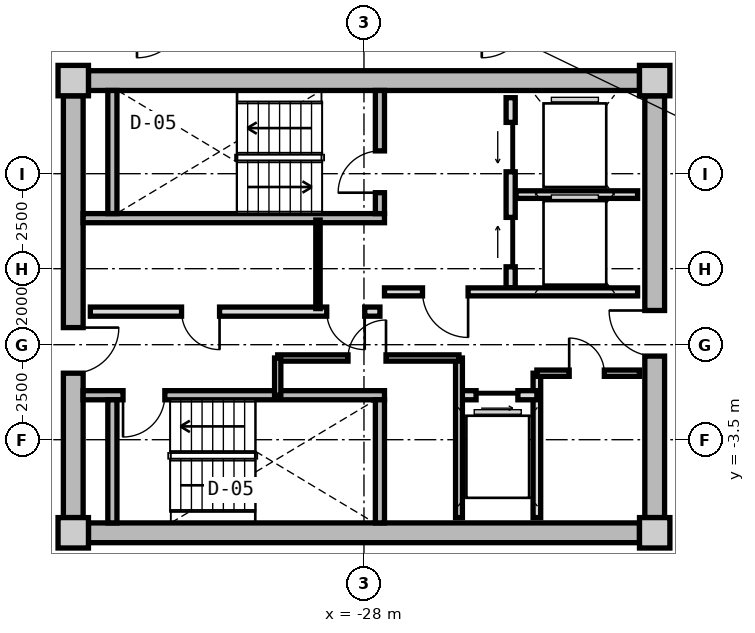
"""IFC4 building model, lengths in metres.
Left out: names, types, materials, properties, quantities, classifications, styles, units other than length and angle.
Written with IfcOpenShell. Run it as: python <this file> out.ifc"""

import sys

from ifc_helpers import new_model, si_unit, direction, frame, frame_2d, origin, origin_2d, place, context, subcontext, project, spatial, rectangle, extrude, source, transform, mapped, element, fill, save


model = new_model("IFC4")
c1 = context("Model", 3, precision=1e-05, world=origin(), true_north=direction((0.0, 1.0)))
c2 = subcontext(c1, "Body", "Model", "MODEL_VIEW")
j1 = project(units=[si_unit("LENGTHUNIT", "METRE"), si_unit("PLANEANGLEUNIT", "RADIAN")], contexts=[c1])
p1 = place(None, origin())
s1 = spatial("IfcSite", under=j1, at=p1, CompositionType="ELEMENT")
p2 = place(p1, origin())
s2 = spatial("IfcBuilding", under=s1, at=p2, CompositionType="ELEMENT")
p3 = place(p2, frame((0.0, 0.0, 213.9)))
s3 = spatial("IfcBuildingStorey", under=s2, at=p3, CompositionType="ELEMENT", Elevation=213.9)
m1 = source(origin(), c2, "Body", "SweptSolid", [
    extrude(rectangle(XDim=0.8, YDim=0.8, at=origin_2d()), origin(), (0.0, 0.0, 1.0), 3.05),
])
for number, where, z_axis, x_axis in (
    (1, (-35.65, -5.95, 0.0), (0.0, 0.0, 1.0), (1.0, 0.0, 0.0)),
    (2, (-20.35, -5.95, 0.0), (0.0, 0.0, 1.0), (1.0, 0.0, 0.0)),
    (3, (-20.35, 5.95, 0.0), (0.0, 0.0, 1.0), (1.0, 0.0, 0.0)),
    (4, (-35.65, 5.95, 0.0), (0.0, 0.0, 1.0), (1.0, 0.0, 0.0)),
):
    element("IfcColumn", number, at=place(p3, frame(where, z_axis=z_axis, x_axis=x_axis)), inside=s3, PredefinedType="COLUMN", context=c2, shape_type="MappedRepresentation", body=[
        mapped(m1, transform((0.0, 0.0, 0.0), x_axis=(1.0, 0.0, 0.0), y_axis=(0.0, 1.0, 0.0), z_axis=(0.0, 0.0, 1.0), scale=1.0)),
    ])
m2 = source(origin(), c2, "Body", "SweptSolid", [
    extrude(rectangle(XDim=14.5, YDim=0.52, at=frame_2d((7.25, 0.0))), origin(), (0.0, 0.0, 1.0), 2.76),
])
for number, where, z_axis, x_axis in (
    (5, (-35.25, 5.95, 0.0), (0.0, 0.0, 1.0), (1.0, 0.0, 0.0)),
    (6, (-20.75, -5.95, 0.0), (0.0, 0.0, 1.0), (-1.0, 0.0, 0.0)),
):
    element("IfcWall", number, at=place(p3, frame(where, z_axis=z_axis, x_axis=x_axis)), inside=s3, PredefinedType="SHEAR", context=c2, shape_type="MappedRepresentation", body=[
        mapped(m2, transform((0.0, 0.0, 0.0), x_axis=(1.0, 0.0, 0.0), y_axis=(0.0, 1.0, 0.0), z_axis=(0.0, 0.0, 1.0), scale=1.0)),
    ])
m3 = source(origin(), c2, "Body", "SweptSolid", [
    extrude(rectangle(XDim=11.1, YDim=0.52, at=frame_2d((5.55, 0.0))), origin(), (0.0, 0.0, 1.0), 2.76),
])
p4 = place(p3, frame((-35.65, -5.55, 0.0), z_axis=(0.0, 0.0, 1.0), x_axis=(0.0, 1.0, 0.0)))
e7 = element("IfcWall", 7, at=p4, inside=s3, PredefinedType="SHEAR", context=c2, shape_type="MappedRepresentation", body=[
    mapped(m3, transform((0.0, 0.0, 0.0), x_axis=(1.0, 0.0, 0.0), y_axis=(0.0, 1.0, 0.0), z_axis=(0.0, 0.0, 1.0), scale=1.0)),
])
p5 = place(p4, frame((3.8, 0.0, 0.0)))
e8 = element("IfcOpeningElement", 8, at=p5, cuts=e7, PredefinedType="OPENING", context=c2, shape_type="SweptSolid", body=[
    extrude(rectangle(XDim=1.2, YDim=2.15, at=frame_2d((0.6, 1.075))), frame((0.0, 0.27, 0.0), z_axis=(0.0, -1.0, 0.0), x_axis=(1.0, 0.0, 0.0)), (0.0, 0.0, 1.0), 0.54),
])
p6 = place(p3, frame((-20.35, 5.55, 0.0), z_axis=(0.0, 0.0, 1.0), x_axis=(0.0, -1.0, 0.0)))
e9 = element("IfcWall", 9, at=p6, inside=s3, PredefinedType="SHEAR", context=c2, shape_type="MappedRepresentation", body=[
    mapped(m3, transform((0.0, 0.0, 0.0), x_axis=(1.0, 0.0, 0.0), y_axis=(0.0, 1.0, 0.0), z_axis=(0.0, 0.0, 1.0), scale=1.0)),
])
p7 = place(p6, frame((5.65, 0.0, 0.0)))
e10 = element("IfcOpeningElement", 10, at=p7, cuts=e9, PredefinedType="OPENING", context=c2, shape_type="SweptSolid", body=[
    extrude(rectangle(XDim=1.2, YDim=2.15, at=frame_2d((0.6, 1.075))), frame((0.0, 0.27, 0.0), z_axis=(0.0, -1.0, 0.0), x_axis=(1.0, 0.0, 0.0)), (0.0, 0.0, 1.0), 0.54),
])
m4 = source(origin(), c2, "Body", "SweptSolid", [
    extrude(rectangle(XDim=7.93, YDim=0.24, at=frame_2d((3.965, 0.0))), origin(), (0.0, 0.0, 1.0), 2.76),
])
p8 = place(p3, frame((-35.39, 2.33, 0.0), z_axis=(0.0, 0.0, 1.0), x_axis=(1.0, 0.0, 0.0)))
e11 = element("IfcWall", 11, at=p8, inside=s3, PredefinedType="PARTITIONING", context=c2, shape_type="MappedRepresentation", body=[
    mapped(m4, transform((0.0, 0.0, 0.0), x_axis=(1.0, 0.0, 0.0), y_axis=(0.0, 1.0, 0.0), z_axis=(0.0, 0.0, 1.0), scale=1.0)),
])
m5 = source(origin(), c2, "Body", "SweptSolid", [
    extrude(rectangle(XDim=3.24, YDim=0.24, at=frame_2d((1.62, 0.0))), origin(), (0.0, 0.0, 1.0), 2.76),
])
p9 = place(p3, frame((-34.62, 2.45, 0.0), z_axis=(0.0, 0.0, 1.0), x_axis=(0.0, 1.0, 0.0)))
e12 = element("IfcWall", 12, at=p9, inside=s3, PredefinedType="PARTITIONING", context=c2, shape_type="MappedRepresentation", body=[
    mapped(m5, transform((0.0, 0.0, 0.0), x_axis=(1.0, 0.0, 0.0), y_axis=(0.0, 1.0, 0.0), z_axis=(0.0, 0.0, 1.0), scale=1.0)),
])
p10 = place(p3, frame((-27.58, 2.45, 0.0), z_axis=(0.0, 0.0, 1.0), x_axis=(0.0, 1.0, 0.0)))
e13 = element("IfcWall", 13, at=p10, inside=s3, PredefinedType="PARTITIONING", context=c2, shape_type="MappedRepresentation", body=[
    mapped(m5, transform((0.0, 0.0, 0.0), x_axis=(1.0, 0.0, 0.0), y_axis=(0.0, 1.0, 0.0), z_axis=(0.0, 0.0, 1.0), scale=1.0)),
])
p11 = place(p10, frame((0.55, 0.0, 0.0)))
e14 = element("IfcOpeningElement", 14, at=p11, cuts=e13, PredefinedType="OPENING", context=c2, shape_type="SweptSolid", body=[
    extrude(rectangle(XDim=1.1, YDim=2.15, at=frame_2d((0.55, 1.075))), frame((0.0, 0.13, 0.0), z_axis=(0.0, -1.0, 0.0), x_axis=(1.0, 0.0, 0.0)), (0.0, 0.0, 1.0), 0.26),
])
p12 = place(p3, frame((-35.39, -2.33, 0.0), z_axis=(0.0, 0.0, 1.0), x_axis=(1.0, 0.0, 0.0)))
e15 = element("IfcWall", 15, at=p12, inside=s3, PredefinedType="PARTITIONING", context=c2, shape_type="MappedRepresentation", body=[
    mapped(m4, transform((0.0, 0.0, 0.0), x_axis=(1.0, 0.0, 0.0), y_axis=(0.0, 1.0, 0.0), z_axis=(0.0, 0.0, 1.0), scale=1.0)),
])
p13 = place(p12, frame((1.05, 0.0, 0.0)))
e16 = element("IfcOpeningElement", 16, at=p13, cuts=e15, PredefinedType="OPENING", context=c2, shape_type="SweptSolid", body=[
    extrude(rectangle(XDim=1.1, YDim=2.15, at=frame_2d((0.55, 1.075))), frame((0.0, 0.13, 0.0), z_axis=(0.0, -1.0, 0.0), x_axis=(1.0, 0.0, 0.0)), (0.0, 0.0, 1.0), 0.26),
])
for number, where, z_axis, x_axis in (
    (17, (-34.62, -5.69, 0.0), (0.0, 0.0, 1.0), (0.0, 1.0, 0.0)),
    (18, (-27.58, -5.69, 0.0), (0.0, 0.0, 1.0), (0.0, 1.0, 0.0)),
):
    element("IfcWall", number, at=place(p3, frame(where, z_axis=z_axis, x_axis=x_axis)), inside=s3, PredefinedType="PARTITIONING", context=c2, shape_type="MappedRepresentation", body=[
        mapped(m5, transform((0.0, 0.0, 0.0), x_axis=(1.0, 0.0, 0.0), y_axis=(0.0, 1.0, 0.0), z_axis=(0.0, 0.0, 1.0), scale=1.0)),
    ])
m6 = source(origin(), c2, "Body", "SweptSolid", [
    extrude(rectangle(XDim=5.0, YDim=0.24, at=frame_2d((2.5, 0.0))), origin(), (0.0, 0.0, 1.0), 2.745),
])
p14 = place(p3, frame((-24.14, 0.5, 0.0), z_axis=(0.0, 0.0, 1.0), x_axis=(0.0, 1.0, 0.0)))
e19 = element("IfcWall", 19, at=p14, inside=s3, PredefinedType="PARTITIONING", context=c2, shape_type="MappedRepresentation", body=[
    mapped(m6, transform((0.0, 0.0, 0.0), x_axis=(1.0, 0.0, 0.0), y_axis=(0.0, 1.0, 0.0), z_axis=(0.0, 0.0, 1.0), scale=1.0)),
])
p15 = place(p14, frame((3.05, 0.0, 0.0)))
e20 = element("IfcOpeningElement", 20, at=p15, cuts=e19, PredefinedType="OPENING", context=c2, shape_type="SweptSolid", body=[
    extrude(rectangle(XDim=1.3, YDim=2.2, at=frame_2d((0.65, 1.1))), frame((0.0, 0.13, 0.0), z_axis=(0.0, -1.0, 0.0), x_axis=(1.0, 0.0, 0.0)), (0.0, 0.0, 1.0), 0.26),
])
p16 = place(p14, frame((0.55, 0.0, 0.0)))
e21 = element("IfcOpeningElement", 21, at=p16, cuts=e19, PredefinedType="OPENING", context=c2, shape_type="SweptSolid", body=[
    extrude(rectangle(XDim=1.3, YDim=2.2, at=frame_2d((0.65, 1.1))), frame((0.0, 0.13, 0.0), z_axis=(0.0, -1.0, 0.0), x_axis=(1.0, 0.0, 0.0)), (0.0, 0.0, 1.0), 0.26),
])
m7 = source(origin(), c2, "Body", "SweptSolid", [
    extrude(rectangle(XDim=3.2, YDim=0.2, at=frame_2d((1.6, 0.0))), origin(), (0.0, 0.0, 1.0), 2.745),
])
p17 = place(p3, frame((-24.0, 2.95, 0.0), z_axis=(0.0, 0.0, 1.0), x_axis=(1.0, 0.0, 0.0)))
e22 = element("IfcWall", 22, at=p17, inside=s3, PredefinedType="PARTITIONING", context=c2, shape_type="MappedRepresentation", body=[
    mapped(m7, transform((0.0, 0.0, 0.0), x_axis=(1.0, 0.0, 0.0), y_axis=(0.0, 1.0, 0.0), z_axis=(0.0, 0.0, 1.0), scale=1.0)),
])
m8 = source(origin(), c2, "Body", "SweptSolid", [
    extrude(rectangle(XDim=6.66, YDim=0.21, at=frame_2d((3.33, 0.0))), origin(), (0.0, 0.0, 1.0), 2.745),
])
p18 = place(p3, frame((-27.46, 0.39, 0.0), z_axis=(0.0, 0.0, 1.0), x_axis=(1.0, 0.0, 0.0)))
e23 = element("IfcWall", 23, at=p18, inside=s3, PredefinedType="PARTITIONING", context=c2, shape_type="MappedRepresentation", body=[
    mapped(m8, transform((0.0, 0.0, 0.0), x_axis=(1.0, 0.0, 0.0), y_axis=(0.0, 1.0, 0.0), z_axis=(0.0, 0.0, 1.0), scale=1.0)),
])
p19 = place(p18, frame((1.0, 0.0, 0.0)))
e24 = element("IfcOpeningElement", 24, at=p19, cuts=e23, PredefinedType="OPENING", context=c2, shape_type="SweptSolid", body=[
    extrude(rectangle(XDim=1.2, YDim=2.15, at=frame_2d((0.6, 1.075))), frame((0.0, 0.115, 0.0), z_axis=(0.0, -1.0, 0.0), x_axis=(1.0, 0.0, 0.0)), (0.0, 0.0, 1.0), 0.23),
])
m9 = source(origin(), c2, "Body", "SweptSolid", [
    extrude(rectangle(XDim=7.62, YDim=0.24, at=frame_2d((3.81, 0.0))), origin(), (0.0, 0.0, 1.0), 2.745),
])
p20 = place(p3, frame((-35.2, -0.13, 0.0), z_axis=(0.0, 0.0, 1.0), x_axis=(1.0, 0.0, 0.0)))
e25 = element("IfcWall", 25, at=p20, inside=s3, PredefinedType="PARTITIONING", context=c2, shape_type="MappedRepresentation", body=[
    mapped(m9, transform((0.0, 0.0, 0.0), x_axis=(1.0, 0.0, 0.0), y_axis=(0.0, 1.0, 0.0), z_axis=(0.0, 0.0, 1.0), scale=1.0)),
])
p21 = place(p20, frame((6.22, 0.0, 0.0)))
e26 = element("IfcOpeningElement", 26, at=p21, cuts=e25, PredefinedType="OPENING", context=c2, shape_type="SweptSolid", body=[
    extrude(rectangle(XDim=1.0, YDim=2.1, at=frame_2d((0.5, 1.05))), frame((0.0, 0.13, 0.0), z_axis=(0.0, -1.0, 0.0), x_axis=(1.0, 0.0, 0.0)), (0.0, 0.0, 1.0), 0.26),
])
p22 = place(p20, frame((2.4, 0.0, 0.0)))
e27 = element("IfcOpeningElement", 27, at=p22, cuts=e25, PredefinedType="OPENING", context=c2, shape_type="SweptSolid", body=[
    extrude(rectangle(XDim=1.0, YDim=2.1, at=frame_2d((0.5, 1.05))), frame((0.0, 0.13, 0.0), z_axis=(0.0, -1.0, 0.0), x_axis=(1.0, 0.0, 0.0)), (0.0, 0.0, 1.0), 0.26),
])
m10 = source(origin(), c2, "Body", "SweptSolid", [
    extrude(rectangle(XDim=2.33, YDim=0.115, at=frame_2d((1.165, 0.0))), origin(), (0.0, 0.0, 1.0), 2.745),
])
p23 = place(p3, frame((-29.21, -0.05, 0.0), z_axis=(0.0, 0.0, 1.0), x_axis=(0.0, 1.0, 0.0)))
e28 = element("IfcWall", 28, at=p23, inside=s3, PredefinedType="PARTITIONING", context=c2, shape_type="MappedRepresentation", body=[
    mapped(m10, transform((0.0, 0.0, 0.0), x_axis=(1.0, 0.0, 0.0), y_axis=(0.0, 1.0, 0.0), z_axis=(0.0, 0.0, 1.0), scale=1.0)),
])
m11 = source(origin(), c2, "Body", "SweptSolid", [
    extrude(rectangle(XDim=3.8, YDim=0.2, at=frame_2d((1.9, 0.0))), origin(), (0.0, 0.0, 1.0), 2.745),
])
p24 = place(p3, frame((-23.45, -5.55, 0.0), z_axis=(0.0, 0.0, 1.0), x_axis=(0.0, 1.0, 0.0)))
e29 = element("IfcWall", 29, at=p24, inside=s3, PredefinedType="PARTITIONING", context=c2, shape_type="MappedRepresentation", body=[
    mapped(m11, transform((0.0, 0.0, 0.0), x_axis=(1.0, 0.0, 0.0), y_axis=(0.0, 1.0, 0.0), z_axis=(0.0, 0.0, 1.0), scale=1.0)),
])
m12 = source(origin(), c2, "Body", "SweptSolid", [
    extrude(rectangle(XDim=2.05, YDim=0.24, at=frame_2d((1.025, 0.0))), origin(), (0.0, 0.0, 1.0), 2.745),
])
p25 = place(p3, frame((-25.5, -2.33, 0.0), z_axis=(0.0, 0.0, 1.0), x_axis=(1.0, 0.0, 0.0)))
e30 = element("IfcWall", 30, at=p25, inside=s3, PredefinedType="PARTITIONING", context=c2, shape_type="MappedRepresentation", body=[
    mapped(m12, transform((0.0, 0.0, 0.0), x_axis=(1.0, 0.0, 0.0), y_axis=(0.0, 1.0, 0.0), z_axis=(0.0, 0.0, 1.0), scale=1.0)),
])
p26 = place(p25, frame((0.45, 0.0, 0.0)))
e31 = element("IfcOpeningElement", 31, at=p26, cuts=e30, PredefinedType="OPENING", context=c2, shape_type="SweptSolid", body=[
    extrude(rectangle(XDim=1.1, YDim=2.2, at=frame_2d((0.55, 1.1))), frame((0.0, 0.13, 0.0), z_axis=(0.0, -1.0, 0.0), x_axis=(1.0, 0.0, 0.0)), (0.0, 0.0, 1.0), 0.26),
])
m13 = source(origin(), c2, "Body", "SweptSolid", [
    extrude(rectangle(XDim=4.2, YDim=0.18, at=frame_2d((2.1, 0.0))), origin(), (0.0, 0.0, 1.0), 2.745),
])
p27 = place(p3, frame((-25.5, -5.55, 0.0), z_axis=(0.0, 0.0, 1.0), x_axis=(0.0, 1.0, 0.0)))
e32 = element("IfcWall", 32, at=p27, inside=s3, PredefinedType="PARTITIONING", context=c2, shape_type="MappedRepresentation", body=[
    mapped(m13, transform((0.0, 0.0, 0.0), x_axis=(1.0, 0.0, 0.0), y_axis=(0.0, 1.0, 0.0), z_axis=(0.0, 0.0, 1.0), scale=1.0)),
])
m14 = source(origin(), c2, "Body", "SweptSolid", [
    extrude(rectangle(XDim=4.77, YDim=0.165, at=frame_2d((2.385, 0.0))), origin(), (0.0, 0.0, 1.0), 2.745),
])
p28 = place(p3, frame((-30.27, -1.35, 0.0), z_axis=(0.0, 0.0, 1.0), x_axis=(1.0, 0.0, 0.0)))
e33 = element("IfcWall", 33, at=p28, inside=s3, PredefinedType="PARTITIONING", context=c2, shape_type="MappedRepresentation", body=[
    mapped(m14, transform((0.0, 0.0, 0.0), x_axis=(1.0, 0.0, 0.0), y_axis=(0.0, 1.0, 0.0), z_axis=(0.0, 0.0, 1.0), scale=1.0)),
])
p29 = place(p28, frame((1.85, 0.0, 0.0)))
e34 = element("IfcOpeningElement", 34, at=p29, cuts=e33, PredefinedType="OPENING", context=c2, shape_type="SweptSolid", body=[
    extrude(rectangle(XDim=1.0, YDim=2.1, at=frame_2d((0.5, 1.05))), frame((0.0, 0.093, 0.0), z_axis=(0.0, -1.0, 0.0), x_axis=(1.0, 0.0, 0.0)), (0.0, 0.0, 1.0), 0.185),
])
m15 = source(origin(), c2, "Body", "SweptSolid", [
    extrude(rectangle(XDim=0.98, YDim=0.165, at=frame_2d((0.49, 0.0))), origin(), (0.0, 0.0, 1.0), 2.745),
])
p30 = place(p3, frame((-30.27, -2.33, 0.0), z_axis=(0.0, 0.0, 1.0), x_axis=(0.0, 1.0, 0.0)))
e35 = element("IfcWall", 35, at=p30, inside=s3, PredefinedType="PARTITIONING", context=c2, shape_type="MappedRepresentation", body=[
    mapped(m15, transform((0.0, 0.0, 0.0), x_axis=(1.0, 0.0, 0.0), y_axis=(0.0, 1.0, 0.0), z_axis=(0.0, 0.0, 1.0), scale=1.0)),
])
m16 = source(origin(), c2, "Body", "SweptSolid", [
    extrude(rectangle(XDim=2.7, YDim=0.165, at=frame_2d((1.35, 0.0))), origin(), (0.0, 0.0, 1.0), 2.745),
])
p31 = place(p3, frame((-23.45, -1.75, 0.0), z_axis=(0.0, 0.0, 1.0), x_axis=(1.0, 0.0, 0.0)))
e36 = element("IfcWall", 36, at=p31, inside=s3, PredefinedType="PARTITIONING", context=c2, shape_type="MappedRepresentation", body=[
    mapped(m16, transform((0.0, 0.0, 0.0), x_axis=(1.0, 0.0, 0.0), y_axis=(0.0, 1.0, 0.0), z_axis=(0.0, 0.0, 1.0), scale=1.0)),
])
p32 = place(p31, frame((0.85, 0.0, 0.0)))
e37 = element("IfcOpeningElement", 37, at=p32, cuts=e36, PredefinedType="OPENING", context=c2, shape_type="SweptSolid", body=[
    extrude(rectangle(XDim=0.925, YDim=2.1, at=frame_2d((0.462, 1.05))), frame((0.0, 0.093, 0.0), z_axis=(0.0, -1.0, 0.0), x_axis=(1.0, 0.0, 0.0)), (0.0, 0.0, 1.0), 0.185),
])
m17 = source(origin(), c2, "Body", "SweptSolid", [
    extrude(rectangle(XDim=1.1, YDim=2.15, at=frame_2d((0.55, 1.075))), frame((0.0, 0.025, 0.0), z_axis=(0.0, -1.0, 0.0), x_axis=(1.0, 0.0, 0.0)), (0.0, 0.0, 1.0), 0.05),
])
p33 = place(p11, origin())
e38 = element("IfcDoor", 38, at=p33, inside=s3, OperationType="SINGLE_SWING_LEFT", PredefinedType="DOOR", context=c2, shape_type="MappedRepresentation", body=[
    mapped(m17, transform((0.0, 0.0, 0.0), x_axis=(1.0, 0.0, 0.0), y_axis=(0.0, 1.0, 0.0), z_axis=(0.0, 0.0, 1.0), scale=1.0)),
])
fill(e14, e38)
p34 = place(p13, frame((1.1, 0.0, 0.0), z_axis=(0.0, 0.0, 1.0), x_axis=(-1.0, 0.0, 0.0)))
e39 = element("IfcDoor", 39, at=p34, inside=s3, OperationType="SINGLE_SWING_RIGHT", PredefinedType="DOOR", context=c2, shape_type="MappedRepresentation", body=[
    mapped(m17, transform((0.0, 0.0, 0.0), x_axis=(1.0, 0.0, 0.0), y_axis=(0.0, 1.0, 0.0), z_axis=(0.0, 0.0, 1.0), scale=1.0)),
])
fill(e16, e39)
m18 = source(origin(), c2, "Body", "SweptSolid", [
    extrude(rectangle(XDim=1.3, YDim=2.2, at=frame_2d((0.65, 1.1))), frame((0.0, 0.025, 0.0), z_axis=(0.0, -1.0, 0.0), x_axis=(1.0, 0.0, 0.0)), (0.0, 0.0, 1.0), 0.05),
])
p35 = place(p15, origin())
e40 = element("IfcDoor", 40, at=p35, inside=s3, OperationType="SLIDING_TO_LEFT", PredefinedType="DOOR", context=c2, shape_type="MappedRepresentation", body=[
    mapped(m18, transform((0.0, 0.0, 0.0), x_axis=(1.0, 0.0, 0.0), y_axis=(0.0, 1.0, 0.0), z_axis=(0.0, 0.0, 1.0), scale=1.0)),
])
fill(e20, e40)
p36 = place(p16, origin())
e41 = element("IfcDoor", 41, at=p36, inside=s3, OperationType="SLIDING_TO_RIGHT", PredefinedType="DOOR", context=c2, shape_type="MappedRepresentation", body=[
    mapped(m18, transform((0.0, 0.0, 0.0), x_axis=(1.0, 0.0, 0.0), y_axis=(0.0, 1.0, 0.0), z_axis=(0.0, 0.0, 1.0), scale=1.0)),
])
fill(e21, e41)
m19 = source(origin(), c2, "Body", "SweptSolid", [
    extrude(rectangle(XDim=1.2, YDim=2.15, at=frame_2d((0.6, 1.075))), frame((0.0, 0.025, 0.0), z_axis=(0.0, -1.0, 0.0), x_axis=(1.0, 0.0, 0.0)), (0.0, 0.0, 1.0), 0.05),
])
p37 = place(p19, frame((1.2, 0.0, 0.0), z_axis=(0.0, 0.0, 1.0), x_axis=(-1.0, 0.0, 0.0)))
e42 = element("IfcDoor", 42, at=p37, inside=s3, OperationType="SINGLE_SWING_LEFT", PredefinedType="DOOR", context=c2, shape_type="MappedRepresentation", body=[
    mapped(m19, transform((0.0, 0.0, 0.0), x_axis=(1.0, 0.0, 0.0), y_axis=(0.0, 1.0, 0.0), z_axis=(0.0, 0.0, 1.0), scale=1.0)),
])
fill(e24, e42)
p38 = place(p5, frame((1.2, 0.0, 0.0), z_axis=(0.0, 0.0, 1.0), x_axis=(-1.0, 0.0, 0.0)))
e43 = element("IfcDoor", 43, at=p38, inside=s3, OperationType="SINGLE_SWING_LEFT", PredefinedType="DOOR", context=c2, shape_type="MappedRepresentation", body=[
    mapped(m19, transform((0.0, 0.0, 0.0), x_axis=(1.0, 0.0, 0.0), y_axis=(0.0, 1.0, 0.0), z_axis=(0.0, 0.0, 1.0), scale=1.0)),
])
fill(e8, e43)
p39 = place(p7, frame((1.2, 0.0, 0.0), z_axis=(0.0, 0.0, 1.0), x_axis=(-1.0, 0.0, 0.0)))
e44 = element("IfcDoor", 44, at=p39, inside=s3, OperationType="SINGLE_SWING_RIGHT", PredefinedType="DOOR", context=c2, shape_type="MappedRepresentation", body=[
    mapped(m19, transform((0.0, 0.0, 0.0), x_axis=(1.0, 0.0, 0.0), y_axis=(0.0, 1.0, 0.0), z_axis=(0.0, 0.0, 1.0), scale=1.0)),
])
fill(e10, e44)
m20 = source(origin(), c2, "Body", "SweptSolid", [
    extrude(rectangle(XDim=1.0, YDim=2.1, at=frame_2d((0.5, 1.05))), frame((0.0, 0.025, 0.0), z_axis=(0.0, -1.0, 0.0), x_axis=(1.0, 0.0, 0.0)), (0.0, 0.0, 1.0), 0.05),
])
p40 = place(p21, frame((1.0, 0.0, 0.0), z_axis=(0.0, 0.0, 1.0), x_axis=(-1.0, 0.0, 0.0)))
e45 = element("IfcDoor", 45, at=p40, inside=s3, OperationType="SINGLE_SWING_LEFT", PredefinedType="DOOR", context=c2, shape_type="MappedRepresentation", body=[
    mapped(m20, transform((0.0, 0.0, 0.0), x_axis=(1.0, 0.0, 0.0), y_axis=(0.0, 1.0, 0.0), z_axis=(0.0, 0.0, 1.0), scale=1.0)),
])
fill(e26, e45)
p41 = place(p22, frame((1.0, 0.0, 0.0), z_axis=(0.0, 0.0, 1.0), x_axis=(-1.0, 0.0, 0.0)))
e46 = element("IfcDoor", 46, at=p41, inside=s3, OperationType="SINGLE_SWING_LEFT", PredefinedType="DOOR", context=c2, shape_type="MappedRepresentation", body=[
    mapped(m20, transform((0.0, 0.0, 0.0), x_axis=(1.0, 0.0, 0.0), y_axis=(0.0, 1.0, 0.0), z_axis=(0.0, 0.0, 1.0), scale=1.0)),
])
fill(e27, e46)
m21 = source(origin(), c2, "Body", "SweptSolid", [
    extrude(rectangle(XDim=1.1, YDim=2.2, at=frame_2d((0.55, 1.1))), frame((0.0, 0.025, 0.0), z_axis=(0.0, -1.0, 0.0), x_axis=(1.0, 0.0, 0.0)), (0.0, 0.0, 1.0), 0.05),
])
p42 = place(p26, frame((1.1, 0.0, 0.0), z_axis=(0.0, 0.0, 1.0), x_axis=(-1.0, 0.0, 0.0)))
e47 = element("IfcDoor", 47, at=p42, inside=s3, OperationType="SLIDING_TO_RIGHT", PredefinedType="DOOR", context=c2, shape_type="MappedRepresentation", body=[
    mapped(m21, transform((0.0, 0.0, 0.0), x_axis=(1.0, 0.0, 0.0), y_axis=(0.0, 1.0, 0.0), z_axis=(0.0, 0.0, 1.0), scale=1.0)),
])
fill(e31, e47)
p43 = place(p29, origin())
e48 = element("IfcDoor", 48, at=p43, inside=s3, OperationType="SINGLE_SWING_RIGHT", PredefinedType="DOOR", context=c2, shape_type="MappedRepresentation", body=[
    mapped(m20, transform((0.0, 0.0, 0.0), x_axis=(1.0, 0.0, 0.0), y_axis=(0.0, 1.0, 0.0), z_axis=(0.0, 0.0, 1.0), scale=1.0)),
])
fill(e34, e48)
m22 = source(origin(), c2, "Body", "SweptSolid", [
    extrude(rectangle(XDim=0.925, YDim=2.1, at=frame_2d((0.462, 1.05))), frame((0.0, 0.025, 0.0), z_axis=(0.0, -1.0, 0.0), x_axis=(1.0, 0.0, 0.0)), (0.0, 0.0, 1.0), 0.05),
])
p44 = place(p32, origin())
e49 = element("IfcDoor", 49, at=p44, inside=s3, OperationType="SINGLE_SWING_LEFT", PredefinedType="DOOR", context=c2, shape_type="MappedRepresentation", body=[
    mapped(m22, transform((0.0, 0.0, 0.0), x_axis=(1.0, 0.0, 0.0), y_axis=(0.0, 1.0, 0.0), z_axis=(0.0, 0.0, 1.0), scale=1.0)),
])
fill(e37, e49)
save(model, sys.argv[1])
